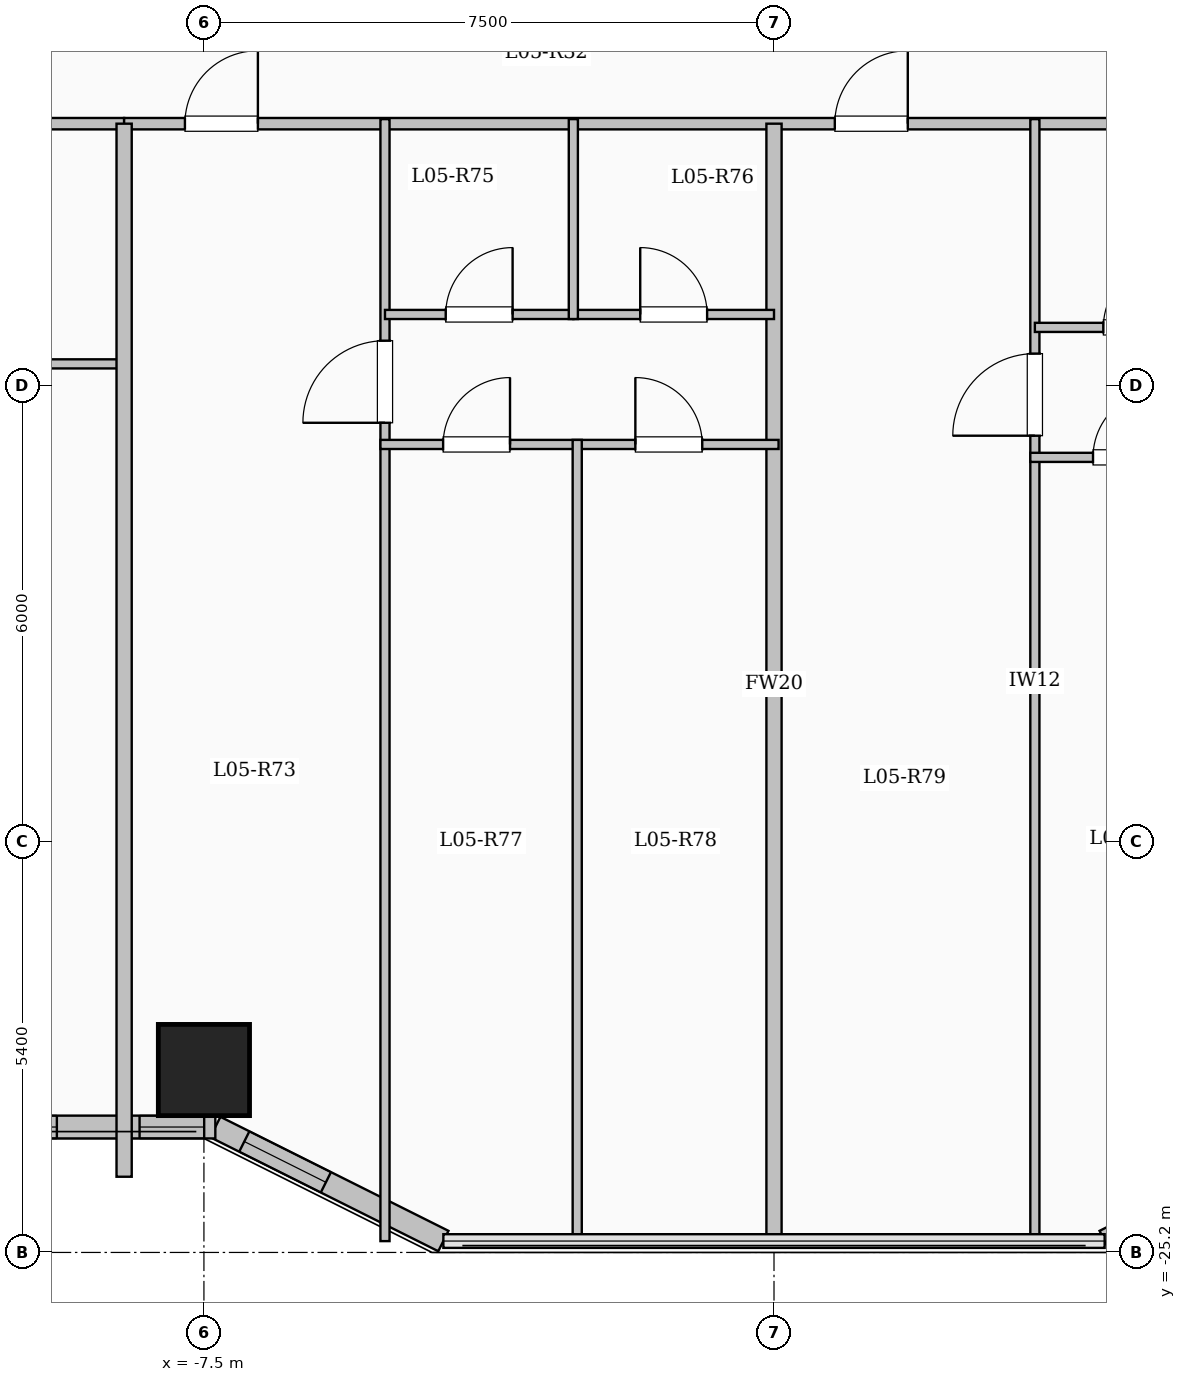
"""IFC4 building model, lengths in metres.
Left out: names, types, materials, properties, quantities, classifications, styles, units other than length and angle.
Written with IfcOpenShell. Run it as: python <this file> out.ifc"""

import sys

from ifc_helpers import new_model, si_unit, direction, frame, frame_2d, origin, origin_2d, place, context, subcontext, project, spatial, rectangle, extrude, element, fill, save


model = new_model("IFC4")
c1 = context("Model", 3, precision=1e-05, world=origin(), true_north=direction((0.0, 1.0)))
c2 = subcontext(c1, "Body", "Model", "MODEL_VIEW")
j1 = project(units=[si_unit("LENGTHUNIT", "METRE"), si_unit("PLANEANGLEUNIT", "RADIAN")], contexts=[c1])
p1 = place(None, origin())
s1 = spatial("IfcSite", under=j1, at=p1, CompositionType="ELEMENT")
p2 = place(p1, origin())
s2 = spatial("IfcBuilding", under=s1, at=p2, CompositionType="ELEMENT")
p3 = place(p2, frame((0.0, 0.0, 24.0)))
s3 = spatial("IfcBuildingStorey", under=s2, at=p3, CompositionType="ELEMENT", Elevation=24.0)
p4 = place(p3, frame((-7.5, -22.8, 0.0), z_axis=(0.0, 0.0, 1.0), x_axis=(1.0, 0.0, 0.0)))
e1 = element("IfcColumn", 1, at=p4, inside=s3, PredefinedType="COLUMN", context=c2, shape_type="SweptSolid", body=[
    extrude(rectangle(XDim=1.2, YDim=1.2, at=origin_2d()), origin(), (0.0, 0.0, 1.0), 3.35),
])
p5 = place(p3, frame((7.35, -23.55, 0.0), z_axis=(0.0, 0.0, 1.0), x_axis=(-0.894427191, -0.4472135955, 0.0)))
e2 = element("IfcWall", 2, at=p5, inside=s3, PredefinedType="SOLIDWALL", context=c2, shape_type="SweptSolid", body=[
    extrude(rectangle(XDim=3.354, YDim=0.3, at=frame_2d((1.677, 0.0))), origin(), (0.0, 0.0, 1.0), 3.1),
])
p6 = place(p5, frame((0.396, 0.0, 0.95)))
e3 = element("IfcOpeningElement", 3, at=p6, cuts=e2, PredefinedType="OPENING", context=c2, shape_type="SweptSolid", body=[
    extrude(rectangle(XDim=0.7, YDim=1.5, at=frame_2d((0.35, 0.75))), frame((0.0, 0.16, 0.0), z_axis=(0.0, -1.0, 0.0), x_axis=(1.0, 0.0, 0.0)), (0.0, 0.0, 1.0), 0.32),
])
p7 = place(p5, frame((2.282, 0.0, 0.95)))
e4 = element("IfcOpeningElement", 4, at=p7, cuts=e2, PredefinedType="OPENING", context=c2, shape_type="SweptSolid", body=[
    extrude(rectangle(XDim=0.7, YDim=1.5, at=frame_2d((0.35, 0.75))), frame((0.0, 0.16, 0.0), z_axis=(0.0, -1.0, 0.0), x_axis=(1.0, 0.0, 0.0)), (0.0, 0.0, 1.0), 0.32),
])
p8 = place(p3, frame((-4.35, -25.05, 0.0), z_axis=(0.0, 0.0, 1.0), x_axis=(-0.894427191, 0.4472135955, 0.0)))
e5 = element("IfcWall", 5, at=p8, inside=s3, PredefinedType="SOLIDWALL", context=c2, shape_type="SweptSolid", body=[
    extrude(rectangle(XDim=3.354, YDim=0.3, at=frame_2d((1.677, 0.0))), origin(), (0.0, 0.0, 1.0), 3.1),
])
p9 = place(p8, frame((1.728, 0.0, 0.95)))
e6 = element("IfcOpeningElement", 6, at=p9, cuts=e5, PredefinedType="OPENING", context=c2, shape_type="SweptSolid", body=[
    extrude(rectangle(XDim=1.2, YDim=1.5, at=frame_2d((0.6, 0.75))), frame((0.0, 0.16, 0.0), z_axis=(0.0, -1.0, 0.0), x_axis=(1.0, 0.0, 0.0)), (0.0, 0.0, 1.0), 0.32),
])
p10 = place(p3, frame((-7.35, -23.55, 0.0), z_axis=(0.0, 0.0, 1.0), x_axis=(-1.0, 0.0, 0.0)))
e7 = element("IfcWall", 7, at=p10, inside=s3, PredefinedType="SOLIDWALL", context=c2, shape_type="SweptSolid", body=[
    extrude(rectangle(XDim=15.3, YDim=0.3, at=frame_2d((7.65, 0.0))), origin(), (0.0, 0.0, 1.0), 3.1),
])
p11 = place(p10, frame((0.147, 0.0, 0.95)))
e8 = element("IfcOpeningElement", 8, at=p11, cuts=e7, PredefinedType="OPENING", context=c2, shape_type="SweptSolid", body=[
    extrude(rectangle(XDim=0.85, YDim=1.5, at=frame_2d((0.425, 0.75))), frame((0.0, 0.16, 0.0), z_axis=(0.0, -1.0, 0.0), x_axis=(1.0, 0.0, 0.0)), (0.0, 0.0, 1.0), 0.32),
])
p12 = place(p10, frame((2.085, 0.0, 0.9)))
e9 = element("IfcOpeningElement", 9, at=p12, cuts=e7, PredefinedType="OPENING", context=c2, shape_type="SweptSolid", body=[
    extrude(rectangle(XDim=1.8, YDim=1.65, at=frame_2d((0.9, 0.825))), frame((0.0, 0.16, 0.0), z_axis=(0.0, -1.0, 0.0), x_axis=(1.0, 0.0, 0.0)), (0.0, 0.0, 1.0), 0.32),
])
p13 = place(p10, frame((5.722, 0.0, 0.9)))
e10 = element("IfcOpeningElement", 10, at=p13, cuts=e7, PredefinedType="OPENING", context=c2, shape_type="SweptSolid", body=[
    extrude(rectangle(XDim=1.8, YDim=1.65, at=frame_2d((0.9, 0.825))), frame((0.0, 0.16, 0.0), z_axis=(0.0, -1.0, 0.0), x_axis=(1.0, 0.0, 0.0)), (0.0, 0.0, 1.0), 0.32),
])
p14 = place(p10, frame((9.358, 0.0, 0.9)))
e11 = element("IfcOpeningElement", 11, at=p14, cuts=e7, PredefinedType="OPENING", context=c2, shape_type="SweptSolid", body=[
    extrude(rectangle(XDim=1.5, YDim=1.65, at=frame_2d((0.75, 0.825))), frame((0.0, 0.16, 0.0), z_axis=(0.0, -1.0, 0.0), x_axis=(1.0, 0.0, 0.0)), (0.0, 0.0, 1.0), 0.32),
])
p15 = place(p10, frame((12.569, 0.0, 0.9)))
e12 = element("IfcOpeningElement", 12, at=p15, cuts=e7, PredefinedType="OPENING", context=c2, shape_type="SweptSolid", body=[
    extrude(rectangle(XDim=1.8, YDim=1.65, at=frame_2d((0.9, 0.825))), frame((0.0, 0.16, 0.0), z_axis=(0.0, -1.0, 0.0), x_axis=(1.0, 0.0, 0.0)), (0.0, 0.0, 1.0), 0.32),
])
p16 = place(p3, frame((-22.55, -10.35, 0.0), z_axis=(0.0, 0.0, 1.0), x_axis=(1.0, 0.0, 0.0)))
e13 = element("IfcWall", 13, at=p16, inside=s3, PredefinedType="PARTITIONING", context=c2, shape_type="SweptSolid", body=[
    extrude(rectangle(XDim=14.0, YDim=0.15, at=frame_2d((7.0, 0.0))), origin(), (0.0, 0.0, 1.0), 3.1),
])
p17 = place(p16, frame((0.7, 0.0, 0.0)))
e14 = element("IfcOpeningElement", 14, at=p17, cuts=e13, PredefinedType="OPENING", context=c2, shape_type="SweptSolid", body=[
    extrude(rectangle(XDim=0.96, YDim=2.15, at=frame_2d((0.48, 1.075))), frame((0.0, 0.085, 0.0), z_axis=(0.0, -1.0, 0.0), x_axis=(1.0, 0.0, 0.0)), (0.0, 0.0, 1.0), 0.17),
])
p18 = place(p16, frame((7.396, 0.0, 0.0)))
e15 = element("IfcOpeningElement", 15, at=p18, cuts=e13, PredefinedType="OPENING", context=c2, shape_type="SweptSolid", body=[
    extrude(rectangle(XDim=0.96, YDim=2.15, at=frame_2d((0.48, 1.075))), frame((0.0, 0.085, 0.0), z_axis=(0.0, -1.0, 0.0), x_axis=(1.0, 0.0, 0.0)), (0.0, 0.0, 1.0), 0.17),
])
p19 = place(p3, frame((-8.55, -10.35, 0.0), z_axis=(0.0, 0.0, 1.0), x_axis=(1.0, 0.0, 0.0)))
e16 = element("IfcWall", 16, at=p19, inside=s3, PredefinedType="PARTITIONING", context=c2, shape_type="SweptSolid", body=[
    extrude(rectangle(XDim=17.1, YDim=0.15, at=frame_2d((8.55, 0.0))), origin(), (0.0, 0.0, 1.0), 3.1),
])
p20 = place(p19, frame((0.8, 0.0, 0.0)))
e17 = element("IfcOpeningElement", 17, at=p20, cuts=e16, PredefinedType="OPENING", context=c2, shape_type="SweptSolid", body=[
    extrude(rectangle(XDim=0.96, YDim=2.15, at=frame_2d((0.48, 1.075))), frame((0.0, 0.085, 0.0), z_axis=(0.0, -1.0, 0.0), x_axis=(1.0, 0.0, 0.0)), (0.0, 0.0, 1.0), 0.17),
])
p21 = place(p19, frame((9.35, 0.0, 0.0)))
e18 = element("IfcOpeningElement", 18, at=p21, cuts=e16, PredefinedType="OPENING", context=c2, shape_type="SweptSolid", body=[
    extrude(rectangle(XDim=0.96, YDim=2.15, at=frame_2d((0.48, 1.075))), frame((0.0, 0.085, 0.0), z_axis=(0.0, -1.0, 0.0), x_axis=(1.0, 0.0, 0.0)), (0.0, 0.0, 1.0), 0.17),
])
p22 = place(p3, frame((-12.144, -13.51, 0.0), z_axis=(0.0, 0.0, 1.0), x_axis=(1.0, 0.0, 0.0)))
e19 = element("IfcWall", 19, at=p22, inside=s3, PredefinedType="PARTITIONING", context=c2, shape_type="SweptSolid", body=[
    extrude(rectangle(XDim=3.604, YDim=0.12, at=frame_2d((1.802, 0.0))), origin(), (0.0, 0.0, 1.0), 3.1),
])
p23 = place(p3, frame((-8.55, -24.204, 0.0), z_axis=(0.0, 0.0, 1.0), x_axis=(0.0, 1.0, 0.0)))
e20 = element("IfcWall", 20, at=p23, inside=s3, PredefinedType="SOLIDWALL", context=c2, shape_type="SweptSolid", body=[
    extrude(rectangle(XDim=13.854, YDim=0.2, at=frame_2d((6.927, 0.0))), origin(), (0.0, 0.0, 1.0), 3.1),
])
p24 = place(p3, frame((0.0, -25.08, 0.0), z_axis=(0.0, 0.0, 1.0), x_axis=(0.0, 1.0, 0.0)))
e21 = element("IfcWall", 21, at=p24, inside=s3, PredefinedType="SOLIDWALL", context=c2, shape_type="SweptSolid", body=[
    extrude(rectangle(XDim=14.73, YDim=0.2, at=frame_2d((7.365, 0.0))), origin(), (0.0, 0.0, 1.0), 3.1),
])
p25 = place(p3, frame((-5.118, -25.051, 0.0), z_axis=(0.0, 0.0, 1.0), x_axis=(0.0, 1.0, 0.0)))
e22 = element("IfcWall", 22, at=p25, inside=s3, PredefinedType="PARTITIONING", context=c2, shape_type="SweptSolid", body=[
    extrude(rectangle(XDim=14.761, YDim=0.12, at=frame_2d((7.38, 0.0))), origin(), (0.0, 0.0, 1.0), 3.1),
])
p26 = place(p25, frame((10.766, 0.0, 0.0)))
e23 = element("IfcOpeningElement", 23, at=p26, cuts=e22, PredefinedType="OPENING", context=c2, shape_type="SweptSolid", body=[
    extrude(rectangle(XDim=1.08, YDim=2.15, at=frame_2d((0.54, 1.075))), frame((0.0, 0.07, 0.0), z_axis=(0.0, -1.0, 0.0), x_axis=(1.0, 0.0, 0.0)), (0.0, 0.0, 1.0), 0.14),
])
p27 = place(p3, frame((-5.118, -12.86, 0.0), z_axis=(0.0, 0.0, 1.0), x_axis=(1.0, 0.0, 0.0)))
e24 = element("IfcWall", 24, at=p27, inside=s3, PredefinedType="PARTITIONING", context=c2, shape_type="SweptSolid", body=[
    extrude(rectangle(XDim=2.478, YDim=0.12, at=frame_2d((1.239, 0.0))), origin(), (0.0, 0.0, 1.0), 2.585),
])
p28 = place(p27, frame((0.799, 0.0, 0.0)))
e25 = element("IfcOpeningElement", 25, at=p28, cuts=e24, PredefinedType="OPENING", context=c2, shape_type="SweptSolid", body=[
    extrude(rectangle(XDim=0.88, YDim=2.1, at=frame_2d((0.44, 1.05))), frame((0.0, 0.07, 0.0), z_axis=(0.0, -1.0, 0.0), x_axis=(1.0, 0.0, 0.0)), (0.0, 0.0, 1.0), 0.14),
])
p29 = place(p3, frame((-2.64, -12.86, 0.0), z_axis=(0.0, 0.0, 1.0), x_axis=(1.0, 0.0, 0.0)))
e26 = element("IfcWall", 26, at=p29, inside=s3, PredefinedType="PARTITIONING", context=c2, shape_type="SweptSolid", body=[
    extrude(rectangle(XDim=2.64, YDim=0.12, at=frame_2d((1.32, 0.0))), origin(), (0.0, 0.0, 1.0), 2.585),
])
p30 = place(p29, frame((0.88, 0.0, 0.0)))
e27 = element("IfcOpeningElement", 27, at=p30, cuts=e26, PredefinedType="OPENING", context=c2, shape_type="SweptSolid", body=[
    extrude(rectangle(XDim=0.88, YDim=2.1, at=frame_2d((0.44, 1.05))), frame((0.0, 0.07, 0.0), z_axis=(0.0, -1.0, 0.0), x_axis=(1.0, 0.0, 0.0)), (0.0, 0.0, 1.0), 0.14),
])
p31 = place(p3, frame((-5.178, -14.57, 0.0), z_axis=(0.0, 0.0, 1.0), x_axis=(1.0, 0.0, 0.0)))
e28 = element("IfcWall", 28, at=p31, inside=s3, PredefinedType="PARTITIONING", context=c2, shape_type="SweptSolid", body=[
    extrude(rectangle(XDim=5.238, YDim=0.12, at=frame_2d((2.619, 0.0))), origin(), (0.0, 0.0, 1.0), 3.1),
])
p32 = place(p31, frame((0.825, 0.0, 0.0)))
e29 = element("IfcOpeningElement", 29, at=p32, cuts=e28, PredefinedType="OPENING", context=c2, shape_type="SweptSolid", body=[
    extrude(rectangle(XDim=0.88, YDim=2.1, at=frame_2d((0.44, 1.05))), frame((0.0, 0.07, 0.0), z_axis=(0.0, -1.0, 0.0), x_axis=(1.0, 0.0, 0.0)), (0.0, 0.0, 1.0), 0.14),
])
p33 = place(p31, frame((3.354, 0.0, 0.0)))
e30 = element("IfcOpeningElement", 30, at=p33, cuts=e28, PredefinedType="OPENING", context=c2, shape_type="SweptSolid", body=[
    extrude(rectangle(XDim=0.88, YDim=2.1, at=frame_2d((0.44, 1.05))), frame((0.0, 0.07, 0.0), z_axis=(0.0, -1.0, 0.0), x_axis=(1.0, 0.0, 0.0)), (0.0, 0.0, 1.0), 0.14),
])
p34 = place(p3, frame((-2.64, -12.92, 0.0), z_axis=(0.0, 0.0, 1.0), x_axis=(0.0, 1.0, 0.0)))
e31 = element("IfcWall", 31, at=p34, inside=s3, PredefinedType="PARTITIONING", context=c2, shape_type="SweptSolid", body=[
    extrude(rectangle(XDim=2.63, YDim=0.12, at=frame_2d((1.315, 0.0))), origin(), (0.0, 0.0, 1.0), 3.1),
])
p35 = place(p3, frame((-2.589, -25.08, 0.0), z_axis=(0.0, 0.0, 1.0), x_axis=(0.0, 1.0, 0.0)))
e32 = element("IfcWall", 32, at=p35, inside=s3, PredefinedType="PARTITIONING", context=c2, shape_type="SweptSolid", body=[
    extrude(rectangle(XDim=10.57, YDim=0.12, at=frame_2d((5.285, 0.0))), origin(), (0.0, 0.0, 1.0), 3.1),
])
p36 = place(p3, frame((3.432, -25.08, 0.0), z_axis=(0.0, 0.0, 1.0), x_axis=(0.0, 1.0, 0.0)))
e33 = element("IfcWall", 33, at=p36, inside=s3, PredefinedType="PARTITIONING", context=c2, shape_type="SweptSolid", body=[
    extrude(rectangle(XDim=14.79, YDim=0.12, at=frame_2d((7.395, 0.0))), origin(), (0.0, 0.0, 1.0), 3.1),
])
p37 = place(p36, frame((10.625, 0.0, 0.0)))
e34 = element("IfcOpeningElement", 34, at=p37, cuts=e33, PredefinedType="OPENING", context=c2, shape_type="SweptSolid", body=[
    extrude(rectangle(XDim=1.08, YDim=2.15, at=frame_2d((0.54, 1.075))), frame((0.0, 0.07, 0.0), z_axis=(0.0, -1.0, 0.0), x_axis=(1.0, 0.0, 0.0)), (0.0, 0.0, 1.0), 0.14),
])
p38 = place(p3, frame((3.432, -13.03, 0.0), z_axis=(0.0, 0.0, 1.0), x_axis=(1.0, 0.0, 0.0)))
e35 = element("IfcWall", 35, at=p38, inside=s3, PredefinedType="PARTITIONING", context=c2, shape_type="SweptSolid", body=[
    extrude(rectangle(XDim=2.681, YDim=0.12, at=frame_2d((1.341, 0.0))), origin(), (0.0, 0.0, 1.0), 2.585),
])
p39 = place(p38, frame((0.901, 0.0, 0.0)))
e36 = element("IfcOpeningElement", 36, at=p39, cuts=e35, PredefinedType="OPENING", context=c2, shape_type="SweptSolid", body=[
    extrude(rectangle(XDim=0.88, YDim=2.1, at=frame_2d((0.44, 1.05))), frame((0.0, 0.07, 0.0), z_axis=(0.0, -1.0, 0.0), x_axis=(1.0, 0.0, 0.0)), (0.0, 0.0, 1.0), 0.14),
])
p40 = place(p3, frame((3.372, -14.74, 0.0), z_axis=(0.0, 0.0, 1.0), x_axis=(1.0, 0.0, 0.0)))
e37 = element("IfcWall", 37, at=p40, inside=s3, PredefinedType="PARTITIONING", context=c2, shape_type="SweptSolid", body=[
    extrude(rectangle(XDim=5.238, YDim=0.12, at=frame_2d((2.619, 0.0))), origin(), (0.0, 0.0, 1.0), 2.585),
])
p41 = place(p40, frame((0.825, 0.0, 0.0)))
e38 = element("IfcOpeningElement", 38, at=p41, cuts=e37, PredefinedType="OPENING", context=c2, shape_type="SweptSolid", body=[
    extrude(rectangle(XDim=0.88, YDim=2.1, at=frame_2d((0.44, 1.05))), frame((0.0, 0.07, 0.0), z_axis=(0.0, -1.0, 0.0), x_axis=(1.0, 0.0, 0.0)), (0.0, 0.0, 1.0), 0.14),
])
p42 = place(p40, frame((3.353, 0.0, 0.0)))
e39 = element("IfcOpeningElement", 39, at=p42, cuts=e37, PredefinedType="OPENING", context=c2, shape_type="SweptSolid", body=[
    extrude(rectangle(XDim=0.88, YDim=2.1, at=frame_2d((0.44, 1.05))), frame((0.0, 0.07, 0.0), z_axis=(0.0, -1.0, 0.0), x_axis=(1.0, 0.0, 0.0)), (0.0, 0.0, 1.0), 0.14),
])
p43 = place(p9, origin())
e40 = element("IfcWindow", 40, at=p43, inside=s3, PartitioningType="SINGLE_PANEL", PredefinedType="WINDOW", context=c2, shape_type="SweptSolid", body=[
    extrude(rectangle(XDim=1.2, YDim=1.5, at=frame_2d((0.6, 0.75))), frame((0.0, 0.03, 0.0), z_axis=(0.0, -1.0, 0.0), x_axis=(1.0, 0.0, 0.0)), (0.0, 0.0, 1.0), 0.06),
])
fill(e6, e40)
p44 = place(p11, origin())
e41 = element("IfcWindow", 41, at=p44, inside=s3, PartitioningType="SINGLE_PANEL", PredefinedType="WINDOW", context=c2, shape_type="SweptSolid", body=[
    extrude(rectangle(XDim=0.85, YDim=1.5, at=frame_2d((0.425, 0.75))), frame((0.0, 0.03, 0.0), z_axis=(0.0, -1.0, 0.0), x_axis=(1.0, 0.0, 0.0)), (0.0, 0.0, 1.0), 0.06),
])
fill(e8, e41)
p45 = place(p12, origin())
e42 = element("IfcWindow", 42, at=p45, inside=s3, PartitioningType="SINGLE_PANEL", PredefinedType="WINDOW", context=c2, shape_type="SweptSolid", body=[
    extrude(rectangle(XDim=1.8, YDim=1.65, at=frame_2d((0.9, 0.825))), frame((0.0, 0.03, 0.0), z_axis=(0.0, -1.0, 0.0), x_axis=(1.0, 0.0, 0.0)), (0.0, 0.0, 1.0), 0.06),
])
fill(e9, e42)
p46 = place(p20, origin())
e43 = element("IfcDoor", 43, at=p46, inside=s3, OperationType="SINGLE_SWING_RIGHT", PredefinedType="DOOR", context=c2, shape_type="SweptSolid", body=[
    extrude(rectangle(XDim=0.96, YDim=2.15, at=frame_2d((0.48, 1.075))), frame((0.0, 0.025, 0.0), z_axis=(0.0, -1.0, 0.0), x_axis=(1.0, 0.0, 0.0)), (0.0, 0.0, 1.0), 0.05),
])
fill(e17, e43)
p47 = place(p26, origin())
e44 = element("IfcDoor", 44, at=p47, inside=s3, OperationType="SINGLE_SWING_LEFT", PredefinedType="DOOR", context=c2, shape_type="SweptSolid", body=[
    extrude(rectangle(XDim=1.08, YDim=2.15, at=frame_2d((0.54, 1.075))), frame((0.0, 0.025, 0.0), z_axis=(0.0, -1.0, 0.0), x_axis=(1.0, 0.0, 0.0)), (0.0, 0.0, 1.0), 0.05),
])
fill(e23, e44)
p48 = place(p28, origin())
e45 = element("IfcDoor", 45, at=p48, inside=s3, OperationType="SINGLE_SWING_RIGHT", PredefinedType="DOOR", context=c2, shape_type="SweptSolid", body=[
    extrude(rectangle(XDim=0.88, YDim=2.1, at=frame_2d((0.44, 1.05))), frame((0.0, 0.025, 0.0), z_axis=(0.0, -1.0, 0.0), x_axis=(1.0, 0.0, 0.0)), (0.0, 0.0, 1.0), 0.05),
])
fill(e25, e45)
p49 = place(p30, origin())
e46 = element("IfcDoor", 46, at=p49, inside=s3, OperationType="SINGLE_SWING_LEFT", PredefinedType="DOOR", context=c2, shape_type="SweptSolid", body=[
    extrude(rectangle(XDim=0.88, YDim=2.1, at=frame_2d((0.44, 1.05))), frame((0.0, 0.025, 0.0), z_axis=(0.0, -1.0, 0.0), x_axis=(1.0, 0.0, 0.0)), (0.0, 0.0, 1.0), 0.05),
])
fill(e27, e46)
p50 = place(p32, origin())
e47 = element("IfcDoor", 47, at=p50, inside=s3, OperationType="SINGLE_SWING_RIGHT", PredefinedType="DOOR", context=c2, shape_type="SweptSolid", body=[
    extrude(rectangle(XDim=0.88, YDim=2.1, at=frame_2d((0.44, 1.05))), frame((0.0, 0.025, 0.0), z_axis=(0.0, -1.0, 0.0), x_axis=(1.0, 0.0, 0.0)), (0.0, 0.0, 1.0), 0.05),
])
fill(e29, e47)
p51 = place(p33, origin())
e48 = element("IfcDoor", 48, at=p51, inside=s3, OperationType="SINGLE_SWING_LEFT", PredefinedType="DOOR", context=c2, shape_type="SweptSolid", body=[
    extrude(rectangle(XDim=0.88, YDim=2.1, at=frame_2d((0.44, 1.05))), frame((0.0, 0.025, 0.0), z_axis=(0.0, -1.0, 0.0), x_axis=(1.0, 0.0, 0.0)), (0.0, 0.0, 1.0), 0.05),
])
fill(e30, e48)
p52 = place(p21, origin())
e49 = element("IfcDoor", 49, at=p52, inside=s3, OperationType="SINGLE_SWING_RIGHT", PredefinedType="DOOR", context=c2, shape_type="SweptSolid", body=[
    extrude(rectangle(XDim=0.96, YDim=2.15, at=frame_2d((0.48, 1.075))), frame((0.0, 0.025, 0.0), z_axis=(0.0, -1.0, 0.0), x_axis=(1.0, 0.0, 0.0)), (0.0, 0.0, 1.0), 0.05),
])
fill(e18, e49)
p53 = place(p37, origin())
e50 = element("IfcDoor", 50, at=p53, inside=s3, OperationType="SINGLE_SWING_LEFT", PredefinedType="DOOR", context=c2, shape_type="SweptSolid", body=[
    extrude(rectangle(XDim=1.08, YDim=2.15, at=frame_2d((0.54, 1.075))), frame((0.0, 0.025, 0.0), z_axis=(0.0, -1.0, 0.0), x_axis=(1.0, 0.0, 0.0)), (0.0, 0.0, 1.0), 0.05),
])
fill(e34, e50)
p54 = place(p39, origin())
e51 = element("IfcDoor", 51, at=p54, inside=s3, OperationType="SINGLE_SWING_RIGHT", PredefinedType="DOOR", context=c2, shape_type="SweptSolid", body=[
    extrude(rectangle(XDim=0.88, YDim=2.1, at=frame_2d((0.44, 1.05))), frame((0.0, 0.025, 0.0), z_axis=(0.0, -1.0, 0.0), x_axis=(1.0, 0.0, 0.0)), (0.0, 0.0, 1.0), 0.05),
])
fill(e36, e51)
p55 = place(p41, origin())
e52 = element("IfcDoor", 52, at=p55, inside=s3, OperationType="SINGLE_SWING_RIGHT", PredefinedType="DOOR", context=c2, shape_type="SweptSolid", body=[
    extrude(rectangle(XDim=0.88, YDim=2.1, at=frame_2d((0.44, 1.05))), frame((0.0, 0.025, 0.0), z_axis=(0.0, -1.0, 0.0), x_axis=(1.0, 0.0, 0.0)), (0.0, 0.0, 1.0), 0.05),
])
fill(e38, e52)
save(model, sys.argv[1])
